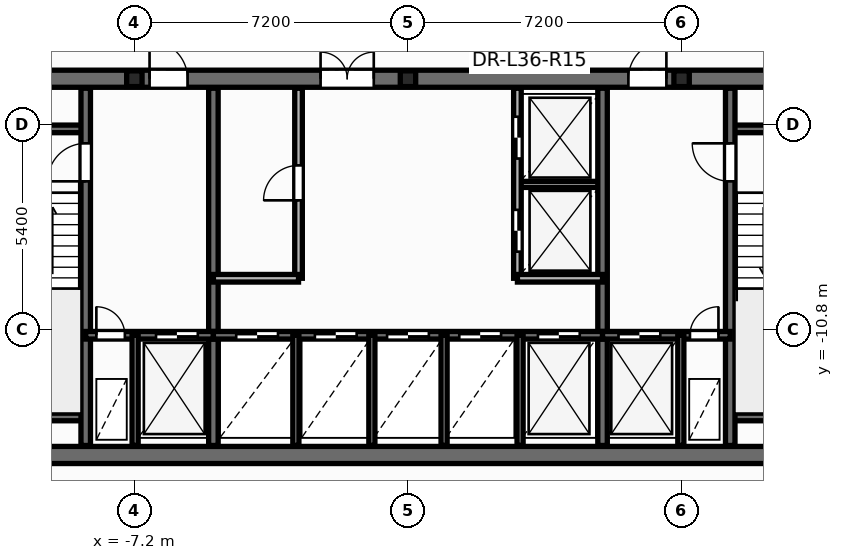
"""IFC4 building model, lengths in metres.
Left out: names, types, materials, properties, quantities, classifications, styles, units other than length and angle.
Written with IfcOpenShell. Run it as: python <this file> out.ifc"""

import sys

from ifc_helpers import new_model, si_unit, direction, frame, frame_2d, origin, origin_2d, place, context, subcontext, project, spatial, rectangle, i_section, extrude, element, fill, save


model = new_model("IFC4")
c1 = context("Model", 3, precision=1e-05, world=origin(), true_north=direction((0.0, 1.0)))
c2 = subcontext(c1, "Body", "Model", "MODEL_VIEW")
j1 = project(units=[si_unit("LENGTHUNIT", "METRE"), si_unit("PLANEANGLEUNIT", "RADIAN")], contexts=[c1])
p1 = place(None, origin())
s1 = spatial("IfcSite", under=j1, at=p1, CompositionType="ELEMENT")
p2 = place(p1, origin())
s2 = spatial("IfcBuilding", under=s1, at=p2, CompositionType="ELEMENT")
p3 = place(p2, frame((0.0, 0.0, 140.1)))
s3 = spatial("IfcBuildingStorey", under=s2, at=p3, CompositionType="ELEMENT", Elevation=140.1)
for number, where, z_axis, x_axis in (
    (1, (-7.2, -4.2, 0.0), (0.0, 0.0, 1.0), (1.0, 0.0, 0.0)),
    (2, (0.0, -4.2, 0.0), (0.0, 0.0, 1.0), (1.0, 0.0, 0.0)),
    (3, (7.2, -4.2, 0.0), (0.0, 0.0, 1.0), (1.0, 0.0, 0.0)),
):
    element("IfcColumn", number, at=place(p3, frame(where, z_axis=z_axis, x_axis=x_axis)), inside=s3, PredefinedType="PILASTER", context=c2, shape_type="SweptSolid", body=[
        extrude(i_section(OverallWidth=0.405, OverallDepth=0.414, WebThickness=0.022, FlangeThickness=0.032, at=origin_2d()), origin(), (0.0, 0.0, 1.0), 3.6),
    ])
p4 = place(p3, frame((2.88, -6.98, 0.0), z_axis=(0.0, 0.0, 1.0), x_axis=(1.0, 0.0, 0.0)))
e4 = element("IfcWall", 4, at=p4, inside=s3, PredefinedType="PARTITIONING", context=c2, shape_type="SweptSolid", body=[
    extrude(rectangle(XDim=2.24, YDim=0.16, at=frame_2d((1.12, 0.0))), origin(), (0.0, 0.0, 1.0), 3.35),
])
p5 = place(p3, frame((-12.65, -14.1, 0.0), z_axis=(0.0, 0.0, 1.0), x_axis=(1.0, 0.0, 0.0)))
e5 = element("IfcWall", 5, at=p5, inside=s3, PredefinedType="SHEAR", context=c2, shape_type="SweptSolid", body=[
    extrude(rectangle(XDim=25.3, YDim=0.45, at=frame_2d((12.65, 0.0))), origin(), (0.0, 0.0, 1.0), 3.6),
])
p6 = place(p3, frame((-12.65, -4.2, 0.0), z_axis=(0.0, 0.0, 1.0), x_axis=(1.0, 0.0, 0.0)))
e6 = element("IfcWall", 6, at=p6, inside=s3, PredefinedType="SHEAR", context=c2, shape_type="SweptSolid", body=[
    extrude(rectangle(XDim=25.3, YDim=0.45, at=frame_2d((12.65, 0.0))), origin(), (0.0, 0.0, 1.0), 3.6),
])
p7 = place(p6, frame((1.85, 0.0, 0.0)))
e7 = element("IfcOpeningElement", 7, at=p7, cuts=e6, PredefinedType="OPENING", context=c2, shape_type="SweptSolid", body=[
    extrude(rectangle(XDim=0.756, YDim=2.054, at=frame_2d((0.375, 1.027))), frame((0.0, 0.235, 0.0), z_axis=(0.0, -1.0, 0.0), x_axis=(1.0, 0.0, 0.0)), (0.0, 0.0, 1.0), 0.47),
])
p8 = place(p6, frame((22.65, 0.0, 0.0)))
e8 = element("IfcOpeningElement", 8, at=p8, cuts=e6, PredefinedType="OPENING", context=c2, shape_type="SweptSolid", body=[
    extrude(rectangle(XDim=0.756, YDim=2.054, at=frame_2d((0.375, 1.027))), frame((0.0, 0.235, 0.0), z_axis=(0.0, -1.0, 0.0), x_axis=(1.0, 0.0, 0.0)), (0.0, 0.0, 1.0), 0.47),
])
p9 = place(p6, frame((5.85, 0.0, 0.0)))
e9 = element("IfcOpeningElement", 9, at=p9, cuts=e6, PredefinedType="OPENING", context=c2, shape_type="SweptSolid", body=[
    extrude(rectangle(XDim=1.006, YDim=2.104, at=frame_2d((0.5, 1.052))), frame((0.0, 0.235, 0.0), z_axis=(0.0, -1.0, 0.0), x_axis=(1.0, 0.0, 0.0)), (0.0, 0.0, 1.0), 0.47),
])
p10 = place(p6, frame((10.35, 0.0, 0.0)))
e10 = element("IfcOpeningElement", 10, at=p10, cuts=e6, PredefinedType="OPENING", context=c2, shape_type="SweptSolid", body=[
    extrude(rectangle(XDim=1.406, YDim=2.154, at=frame_2d((0.7, 1.077))), frame((0.0, 0.235, 0.0), z_axis=(0.0, -1.0, 0.0), x_axis=(1.0, 0.0, 0.0)), (0.0, 0.0, 1.0), 0.47),
])
p11 = place(p6, frame((18.45, 0.0, 0.0)))
e11 = element("IfcOpeningElement", 11, at=p11, cuts=e6, PredefinedType="OPENING", context=c2, shape_type="SweptSolid", body=[
    extrude(rectangle(XDim=1.006, YDim=2.104, at=frame_2d((0.5, 1.052))), frame((0.0, 0.235, 0.0), z_axis=(0.0, -1.0, 0.0), x_axis=(1.0, 0.0, 0.0)), (0.0, 0.0, 1.0), 0.47),
])
for number, where, z_axis, x_axis in (
    (12, (-12.35, -5.52, 0.0), (0.0, 0.0, 1.0), (1.0, 0.0, 0.0)),
    (13, (-12.35, -13.1, 0.0), (0.0, 0.0, 1.0), (1.0, 0.0, 0.0)),
    (14, (8.48, -5.52, 0.0), (0.0, 0.0, 1.0), (1.0, 0.0, 0.0)),
    (15, (8.48, -13.1, 0.0), (0.0, 0.0, 1.0), (1.0, 0.0, 0.0)),
):
    element("IfcWall", number, at=place(p3, frame(where, z_axis=z_axis, x_axis=x_axis)), inside=s3, PredefinedType="SOLIDWALL", context=c2, shape_type="SweptSolid", body=[
        extrude(rectangle(XDim=3.87, YDim=0.2, at=frame_2d((1.935, 0.0))), origin(), (0.0, 0.0, 1.0), 3.6),
    ])
p12 = place(p3, frame((-8.48, -13.85, 0.0), z_axis=(0.0, 0.0, 1.0), x_axis=(0.0, 1.0, 0.0)))
e16 = element("IfcWall", 16, at=p12, inside=s3, PredefinedType="SHEAR", context=c2, shape_type="SweptSolid", body=[
    extrude(rectangle(XDim=9.4, YDim=0.25, at=frame_2d((4.7, 0.0))), origin(), (0.0, 0.0, 1.0), 3.6),
])
p13 = place(p12, frame((6.95, 0.0, 0.0)))
e17 = element("IfcOpeningElement", 17, at=p13, cuts=e16, PredefinedType="OPENING", context=c2, shape_type="SweptSolid", body=[
    extrude(rectangle(XDim=1.006, YDim=2.104, at=frame_2d((0.5, 1.052))), frame((0.0, 0.135, 0.0), z_axis=(0.0, -1.0, 0.0), x_axis=(1.0, 0.0, 0.0)), (0.0, 0.0, 1.0), 0.27),
])
p14 = place(p3, frame((8.48, -13.85, 0.0), z_axis=(0.0, 0.0, 1.0), x_axis=(0.0, 1.0, 0.0)))
e18 = element("IfcWall", 18, at=p14, inside=s3, PredefinedType="SHEAR", context=c2, shape_type="SweptSolid", body=[
    extrude(rectangle(XDim=9.4, YDim=0.25, at=frame_2d((4.7, 0.0))), origin(), (0.0, 0.0, 1.0), 3.6),
])
p15 = place(p14, frame((6.95, 0.0, 0.0)))
e19 = element("IfcOpeningElement", 19, at=p15, cuts=e18, PredefinedType="OPENING", context=c2, shape_type="SweptSolid", body=[
    extrude(rectangle(XDim=1.006, YDim=2.104, at=frame_2d((0.5, 1.052))), frame((0.0, 0.135, 0.0), z_axis=(0.0, -1.0, 0.0), x_axis=(1.0, 0.0, 0.0)), (0.0, 0.0, 1.0), 0.27),
])
for number, where, z_axis, x_axis in (
    (20, (-5.12, -13.85, 0.0), (0.0, 0.0, 1.0), (0.0, 1.0, 0.0)),
    (21, (5.12, -13.85, 0.0), (0.0, 0.0, 1.0), (0.0, 1.0, 0.0)),
):
    element("IfcWall", number, at=place(p3, frame(where, z_axis=z_axis, x_axis=x_axis)), inside=s3, PredefinedType="SHEAR", context=c2, shape_type="SweptSolid", body=[
        extrude(rectangle(XDim=9.4, YDim=0.25, at=frame_2d((4.7, 0.0))), origin(), (0.0, 0.0, 1.0), 3.6),
    ])
p16 = place(p3, frame((-8.48, -10.95, 0.0), z_axis=(0.0, 0.0, 1.0), x_axis=(1.0, 0.0, 0.0)))
e22 = element("IfcWall", 22, at=p16, inside=s3, PredefinedType="SOLIDWALL", context=c2, shape_type="SweptSolid", body=[
    extrude(rectangle(XDim=3.36, YDim=0.2, at=frame_2d((1.68, 0.0))), origin(), (0.0, 0.0, 1.0), 3.6),
])
p17 = place(p16, frame((0.28, 0.0, 0.0)))
e23 = element("IfcOpeningElement", 23, at=p17, cuts=e22, PredefinedType="OPENING", context=c2, shape_type="SweptSolid", body=[
    extrude(rectangle(XDim=0.756, YDim=2.054, at=frame_2d((0.375, 1.027))), frame((0.0, 0.11, 0.0), z_axis=(0.0, -1.0, 0.0), x_axis=(1.0, 0.0, 0.0)), (0.0, 0.0, 1.0), 0.22),
])
p18 = place(p16, frame((1.85, 0.0, 0.0)))
e24 = element("IfcOpeningElement", 24, at=p18, cuts=e22, PredefinedType="OPENING", context=c2, shape_type="SweptSolid", body=[
    extrude(rectangle(XDim=1.106, YDim=2.104, at=frame_2d((0.55, 1.052))), frame((0.0, 0.11, 0.0), z_axis=(0.0, -1.0, 0.0), x_axis=(1.0, 0.0, 0.0)), (0.0, 0.0, 1.0), 0.22),
])
p19 = place(p3, frame((-5.12, -10.95, 0.0), z_axis=(0.0, 0.0, 1.0), x_axis=(1.0, 0.0, 0.0)))
e25 = element("IfcWall", 25, at=p19, inside=s3, PredefinedType="SOLIDWALL", context=c2, shape_type="SweptSolid", body=[
    extrude(rectangle(XDim=10.24, YDim=0.2, at=frame_2d((5.12, 0.0))), origin(), (0.0, 0.0, 1.0), 3.6),
])
p20 = place(p19, frame((0.6, 0.0, 0.0)))
e26 = element("IfcOpeningElement", 26, at=p20, cuts=e25, PredefinedType="OPENING", context=c2, shape_type="SweptSolid", body=[
    extrude(rectangle(XDim=1.106, YDim=2.104, at=frame_2d((0.55, 1.052))), frame((0.0, 0.11, 0.0), z_axis=(0.0, -1.0, 0.0), x_axis=(1.0, 0.0, 0.0)), (0.0, 0.0, 1.0), 0.22),
])
p21 = place(p19, frame((2.67, 0.0, 0.0)))
e27 = element("IfcOpeningElement", 27, at=p21, cuts=e25, PredefinedType="OPENING", context=c2, shape_type="SweptSolid", body=[
    extrude(rectangle(XDim=1.106, YDim=2.104, at=frame_2d((0.55, 1.052))), frame((0.0, 0.11, 0.0), z_axis=(0.0, -1.0, 0.0), x_axis=(1.0, 0.0, 0.0)), (0.0, 0.0, 1.0), 0.22),
])
p22 = place(p19, frame((4.57, 0.0, 0.0)))
e28 = element("IfcOpeningElement", 28, at=p22, cuts=e25, PredefinedType="OPENING", context=c2, shape_type="SweptSolid", body=[
    extrude(rectangle(XDim=1.106, YDim=2.104, at=frame_2d((0.55, 1.052))), frame((0.0, 0.11, 0.0), z_axis=(0.0, -1.0, 0.0), x_axis=(1.0, 0.0, 0.0)), (0.0, 0.0, 1.0), 0.22),
])
p23 = place(p19, frame((6.47, 0.0, 0.0)))
e29 = element("IfcOpeningElement", 29, at=p23, cuts=e25, PredefinedType="OPENING", context=c2, shape_type="SweptSolid", body=[
    extrude(rectangle(XDim=1.106, YDim=2.104, at=frame_2d((0.55, 1.052))), frame((0.0, 0.11, 0.0), z_axis=(0.0, -1.0, 0.0), x_axis=(1.0, 0.0, 0.0)), (0.0, 0.0, 1.0), 0.22),
])
p24 = place(p19, frame((8.54, 0.0, 0.0)))
e30 = element("IfcOpeningElement", 30, at=p24, cuts=e25, PredefinedType="OPENING", context=c2, shape_type="SweptSolid", body=[
    extrude(rectangle(XDim=1.106, YDim=2.104, at=frame_2d((0.55, 1.052))), frame((0.0, 0.11, 0.0), z_axis=(0.0, -1.0, 0.0), x_axis=(1.0, 0.0, 0.0)), (0.0, 0.0, 1.0), 0.22),
])
p25 = place(p3, frame((5.12, -10.95, 0.0), z_axis=(0.0, 0.0, 1.0), x_axis=(1.0, 0.0, 0.0)))
e31 = element("IfcWall", 31, at=p25, inside=s3, PredefinedType="SOLIDWALL", context=c2, shape_type="SweptSolid", body=[
    extrude(rectangle(XDim=3.36, YDim=0.2, at=frame_2d((1.68, 0.0))), origin(), (0.0, 0.0, 1.0), 3.6),
])
p26 = place(p25, frame((0.42, 0.0, 0.0)))
e32 = element("IfcOpeningElement", 32, at=p26, cuts=e31, PredefinedType="OPENING", context=c2, shape_type="SweptSolid", body=[
    extrude(rectangle(XDim=1.106, YDim=2.104, at=frame_2d((0.55, 1.052))), frame((0.0, 0.11, 0.0), z_axis=(0.0, -1.0, 0.0), x_axis=(1.0, 0.0, 0.0)), (0.0, 0.0, 1.0), 0.22),
])
p27 = place(p25, frame((2.3, 0.0, 0.0)))
e33 = element("IfcOpeningElement", 33, at=p27, cuts=e31, PredefinedType="OPENING", context=c2, shape_type="SweptSolid", body=[
    extrude(rectangle(XDim=0.756, YDim=2.054, at=frame_2d((0.375, 1.027))), frame((0.0, 0.11, 0.0), z_axis=(0.0, -1.0, 0.0), x_axis=(1.0, 0.0, 0.0)), (0.0, 0.0, 1.0), 0.22),
])
for number, where, z_axis, x_axis in (
    (34, (-7.18, -13.85, 0.0), (0.0, 0.0, 1.0), (0.0, 1.0, 0.0)),
    (35, (7.18, -13.85, 0.0), (0.0, 0.0, 1.0), (0.0, 1.0, 0.0)),
    (36, (-2.95, -13.85, 0.0), (0.0, 0.0, 1.0), (0.0, 1.0, 0.0)),
    (37, (2.95, -13.85, 0.0), (0.0, 0.0, 1.0), (0.0, 1.0, 0.0)),
):
    element("IfcWall", number, at=place(p3, frame(where, z_axis=z_axis, x_axis=x_axis)), inside=s3, PredefinedType="PARTITIONING", context=c2, shape_type="SweptSolid", body=[
        extrude(rectangle(XDim=2.9, YDim=0.16, at=frame_2d((1.45, 0.0))), origin(), (0.0, 0.0, 1.0), 2.475),
    ])
p28 = place(p3, frame((-2.88, -9.45, 0.0), z_axis=(0.0, 0.0, 1.0), x_axis=(0.0, 1.0, 0.0)))
e38 = element("IfcWall", 38, at=p28, inside=s3, PredefinedType="SOLIDWALL", context=c2, shape_type="SweptSolid", body=[
    extrude(rectangle(XDim=5.0, YDim=0.2, at=frame_2d((2.5, 0.0))), origin(), (0.0, 0.0, 1.0), 3.35),
])
p29 = place(p28, frame((2.05, 0.0, 0.0)))
e39 = element("IfcOpeningElement", 39, at=p29, cuts=e38, PredefinedType="OPENING", context=c2, shape_type="SweptSolid", body=[
    extrude(rectangle(XDim=0.926, YDim=2.104, at=frame_2d((0.46, 1.052))), frame((0.0, 0.11, 0.0), z_axis=(0.0, -1.0, 0.0), x_axis=(1.0, 0.0, 0.0)), (0.0, 0.0, 1.0), 0.22),
])
p30 = place(p3, frame((-5.12, -9.45, 0.0), z_axis=(0.0, 0.0, 1.0), x_axis=(1.0, 0.0, 0.0)))
e40 = element("IfcWall", 40, at=p30, inside=s3, PredefinedType="SOLIDWALL", context=c2, shape_type="SweptSolid", body=[
    extrude(rectangle(XDim=2.24, YDim=0.2, at=frame_2d((1.12, 0.0))), origin(), (0.0, 0.0, 1.0), 3.35),
])
p31 = place(p3, frame((2.88, -9.45, 0.0), z_axis=(0.0, 0.0, 1.0), x_axis=(0.0, 1.0, 0.0)))
e41 = element("IfcWall", 41, at=p31, inside=s3, PredefinedType="SOLIDWALL", context=c2, shape_type="SweptSolid", body=[
    extrude(rectangle(XDim=5.0, YDim=0.2, at=frame_2d((2.5, 0.0))), origin(), (0.0, 0.0, 1.0), 3.35),
])
p32 = place(p31, frame((0.7, 0.0, 0.0)))
e42 = element("IfcOpeningElement", 42, at=p32, cuts=e41, PredefinedType="OPENING", context=c2, shape_type="SweptSolid", body=[
    extrude(rectangle(XDim=1.106, YDim=2.104, at=frame_2d((0.55, 1.052))), frame((0.0, 0.11, 0.0), z_axis=(0.0, -1.0, 0.0), x_axis=(1.0, 0.0, 0.0)), (0.0, 0.0, 1.0), 0.22),
])
p33 = place(p31, frame((3.15, 0.0, 0.0)))
e43 = element("IfcOpeningElement", 43, at=p33, cuts=e41, PredefinedType="OPENING", context=c2, shape_type="SweptSolid", body=[
    extrude(rectangle(XDim=1.106, YDim=2.104, at=frame_2d((0.55, 1.052))), frame((0.0, 0.11, 0.0), z_axis=(0.0, -1.0, 0.0), x_axis=(1.0, 0.0, 0.0)), (0.0, 0.0, 1.0), 0.22),
])
p34 = place(p3, frame((2.88, -9.45, 0.0), z_axis=(0.0, 0.0, 1.0), x_axis=(1.0, 0.0, 0.0)))
e44 = element("IfcWall", 44, at=p34, inside=s3, PredefinedType="SOLIDWALL", context=c2, shape_type="SweptSolid", body=[
    extrude(rectangle(XDim=2.24, YDim=0.2, at=frame_2d((1.12, 0.0))), origin(), (0.0, 0.0, 1.0), 3.35),
])
for number, where, z_axis, x_axis in (
    (45, (-0.95, -13.85, 0.0), (0.0, 0.0, 1.0), (0.0, 1.0, 0.0)),
    (46, (0.95, -13.85, 0.0), (0.0, 0.0, 1.0), (0.0, 1.0, 0.0)),
):
    element("IfcWall", number, at=place(p3, frame(where, z_axis=z_axis, x_axis=x_axis)), inside=s3, PredefinedType="PARTITIONING", context=c2, shape_type="SweptSolid", body=[
        extrude(rectangle(XDim=2.9, YDim=0.16, at=frame_2d((1.45, 0.0))), origin(), (0.0, 0.0, 1.0), 2.475),
    ])
p35 = place(p29, origin())
e47 = element("IfcDoor", 47, at=p35, inside=s3, OperationType="SINGLE_SWING_LEFT", PredefinedType="DOOR", context=c2, shape_type="SweptSolid", body=[
    extrude(rectangle(XDim=0.92, YDim=2.1, at=frame_2d((0.46, 1.05))), frame((0.0, 0.025, 0.0), z_axis=(0.0, -1.0, 0.0), x_axis=(1.0, 0.0, 0.0)), (0.0, 0.0, 1.0), 0.05),
])
fill(e39, e47)
p36 = place(p32, origin())
e48 = element("IfcDoor", 48, at=p36, inside=s3, OperationType="DOUBLE_DOOR_SLIDING", PredefinedType="DOOR", context=c2, shape_type="SweptSolid", body=[
    extrude(rectangle(XDim=1.1, YDim=2.1, at=frame_2d((0.55, 1.05))), frame((0.0, 0.025, 0.0), z_axis=(0.0, -1.0, 0.0), x_axis=(1.0, 0.0, 0.0)), (0.0, 0.0, 1.0), 0.05),
])
fill(e42, e48)
p37 = place(p33, origin())
e49 = element("IfcDoor", 49, at=p37, inside=s3, OperationType="DOUBLE_DOOR_SLIDING", PredefinedType="DOOR", context=c2, shape_type="SweptSolid", body=[
    extrude(rectangle(XDim=1.1, YDim=2.1, at=frame_2d((0.55, 1.05))), frame((0.0, 0.025, 0.0), z_axis=(0.0, -1.0, 0.0), x_axis=(1.0, 0.0, 0.0)), (0.0, 0.0, 1.0), 0.05),
])
fill(e43, e49)
p38 = place(p13, origin())
e50 = element("IfcDoor", 50, at=p38, inside=s3, OperationType="SINGLE_SWING_LEFT", PredefinedType="DOOR", context=c2, shape_type="SweptSolid", body=[
    extrude(rectangle(XDim=1.0, YDim=2.1, at=frame_2d((0.5, 1.05))), frame((0.0, 0.025, 0.0), z_axis=(0.0, -1.0, 0.0), x_axis=(1.0, 0.0, 0.0)), (0.0, 0.0, 1.0), 0.05),
])
fill(e17, e50)
p39 = place(p15, origin())
e51 = element("IfcDoor", 51, at=p39, inside=s3, OperationType="SINGLE_SWING_RIGHT", PredefinedType="DOOR", context=c2, shape_type="SweptSolid", body=[
    extrude(rectangle(XDim=1.0, YDim=2.1, at=frame_2d((0.5, 1.05))), frame((0.0, 0.025, 0.0), z_axis=(0.0, -1.0, 0.0), x_axis=(1.0, 0.0, 0.0)), (0.0, 0.0, 1.0), 0.05),
])
fill(e19, e51)
p40 = place(p17, origin())
e52 = element("IfcDoor", 52, at=p40, inside=s3, OperationType="SINGLE_SWING_LEFT", PredefinedType="DOOR", context=c2, shape_type="SweptSolid", body=[
    extrude(rectangle(XDim=0.75, YDim=2.05, at=frame_2d((0.375, 1.025))), frame((0.0, 0.025, 0.0), z_axis=(0.0, -1.0, 0.0), x_axis=(1.0, 0.0, 0.0)), (0.0, 0.0, 1.0), 0.05),
])
fill(e23, e52)
p41 = place(p18, origin())
e53 = element("IfcDoor", 53, at=p41, inside=s3, OperationType="DOUBLE_DOOR_SLIDING", PredefinedType="DOOR", context=c2, shape_type="SweptSolid", body=[
    extrude(rectangle(XDim=1.1, YDim=2.1, at=frame_2d((0.55, 1.05))), frame((0.0, 0.025, 0.0), z_axis=(0.0, -1.0, 0.0), x_axis=(1.0, 0.0, 0.0)), (0.0, 0.0, 1.0), 0.05),
])
fill(e24, e53)
p42 = place(p26, origin())
e54 = element("IfcDoor", 54, at=p42, inside=s3, OperationType="DOUBLE_DOOR_SLIDING", PredefinedType="DOOR", context=c2, shape_type="SweptSolid", body=[
    extrude(rectangle(XDim=1.1, YDim=2.1, at=frame_2d((0.55, 1.05))), frame((0.0, 0.025, 0.0), z_axis=(0.0, -1.0, 0.0), x_axis=(1.0, 0.0, 0.0)), (0.0, 0.0, 1.0), 0.05),
])
fill(e32, e54)
p43 = place(p27, origin())
e55 = element("IfcDoor", 55, at=p43, inside=s3, OperationType="SINGLE_SWING_RIGHT", PredefinedType="DOOR", context=c2, shape_type="SweptSolid", body=[
    extrude(rectangle(XDim=0.75, YDim=2.05, at=frame_2d((0.375, 1.025))), frame((0.0, 0.025, 0.0), z_axis=(0.0, -1.0, 0.0), x_axis=(1.0, 0.0, 0.0)), (0.0, 0.0, 1.0), 0.05),
])
fill(e33, e55)
p44 = place(p20, origin())
e56 = element("IfcDoor", 56, at=p44, inside=s3, OperationType="DOUBLE_DOOR_SLIDING", PredefinedType="DOOR", context=c2, shape_type="SweptSolid", body=[
    extrude(rectangle(XDim=1.1, YDim=2.1, at=frame_2d((0.55, 1.05))), frame((0.0, 0.025, 0.0), z_axis=(0.0, -1.0, 0.0), x_axis=(1.0, 0.0, 0.0)), (0.0, 0.0, 1.0), 0.05),
])
fill(e26, e56)
p45 = place(p21, origin())
e57 = element("IfcDoor", 57, at=p45, inside=s3, OperationType="DOUBLE_DOOR_SLIDING", PredefinedType="DOOR", context=c2, shape_type="SweptSolid", body=[
    extrude(rectangle(XDim=1.1, YDim=2.1, at=frame_2d((0.55, 1.05))), frame((0.0, 0.025, 0.0), z_axis=(0.0, -1.0, 0.0), x_axis=(1.0, 0.0, 0.0)), (0.0, 0.0, 1.0), 0.05),
])
fill(e27, e57)
p46 = place(p22, origin())
e58 = element("IfcDoor", 58, at=p46, inside=s3, OperationType="DOUBLE_DOOR_SLIDING", PredefinedType="DOOR", context=c2, shape_type="SweptSolid", body=[
    extrude(rectangle(XDim=1.1, YDim=2.1, at=frame_2d((0.55, 1.05))), frame((0.0, 0.025, 0.0), z_axis=(0.0, -1.0, 0.0), x_axis=(1.0, 0.0, 0.0)), (0.0, 0.0, 1.0), 0.05),
])
fill(e28, e58)
p47 = place(p23, origin())
e59 = element("IfcDoor", 59, at=p47, inside=s3, OperationType="DOUBLE_DOOR_SLIDING", PredefinedType="DOOR", context=c2, shape_type="SweptSolid", body=[
    extrude(rectangle(XDim=1.1, YDim=2.1, at=frame_2d((0.55, 1.05))), frame((0.0, 0.025, 0.0), z_axis=(0.0, -1.0, 0.0), x_axis=(1.0, 0.0, 0.0)), (0.0, 0.0, 1.0), 0.05),
])
fill(e29, e59)
p48 = place(p24, origin())
e60 = element("IfcDoor", 60, at=p48, inside=s3, OperationType="DOUBLE_DOOR_SLIDING", PredefinedType="DOOR", context=c2, shape_type="SweptSolid", body=[
    extrude(rectangle(XDim=1.1, YDim=2.1, at=frame_2d((0.55, 1.05))), frame((0.0, 0.025, 0.0), z_axis=(0.0, -1.0, 0.0), x_axis=(1.0, 0.0, 0.0)), (0.0, 0.0, 1.0), 0.05),
])
fill(e30, e60)
p49 = place(p9, origin())
e61 = element("IfcDoor", 61, at=p49, inside=s3, OperationType="SINGLE_SWING_LEFT", PredefinedType="DOOR", context=c2, shape_type="SweptSolid", body=[
    extrude(rectangle(XDim=1.0, YDim=2.1, at=frame_2d((0.5, 1.05))), frame((0.0, 0.025, 0.0), z_axis=(0.0, -1.0, 0.0), x_axis=(1.0, 0.0, 0.0)), (0.0, 0.0, 1.0), 0.05),
])
fill(e9, e61)
p50 = place(p10, origin())
e62 = element("IfcDoor", 62, at=p50, inside=s3, OperationType="DOUBLE_DOOR_SINGLE_SWING", PredefinedType="DOOR", context=c2, shape_type="SweptSolid", body=[
    extrude(rectangle(XDim=1.4, YDim=2.15, at=frame_2d((0.7, 1.075))), frame((0.0, 0.025, 0.0), z_axis=(0.0, -1.0, 0.0), x_axis=(1.0, 0.0, 0.0)), (0.0, 0.0, 1.0), 0.05),
])
fill(e10, e62)
p51 = place(p11, origin())
e63 = element("IfcDoor", 63, at=p51, inside=s3, OperationType="SINGLE_SWING_RIGHT", PredefinedType="DOOR", context=c2, shape_type="SweptSolid", body=[
    extrude(rectangle(XDim=1.0, YDim=2.1, at=frame_2d((0.5, 1.05))), frame((0.0, 0.025, 0.0), z_axis=(0.0, -1.0, 0.0), x_axis=(1.0, 0.0, 0.0)), (0.0, 0.0, 1.0), 0.05),
])
fill(e11, e63)
save(model, sys.argv[1])
